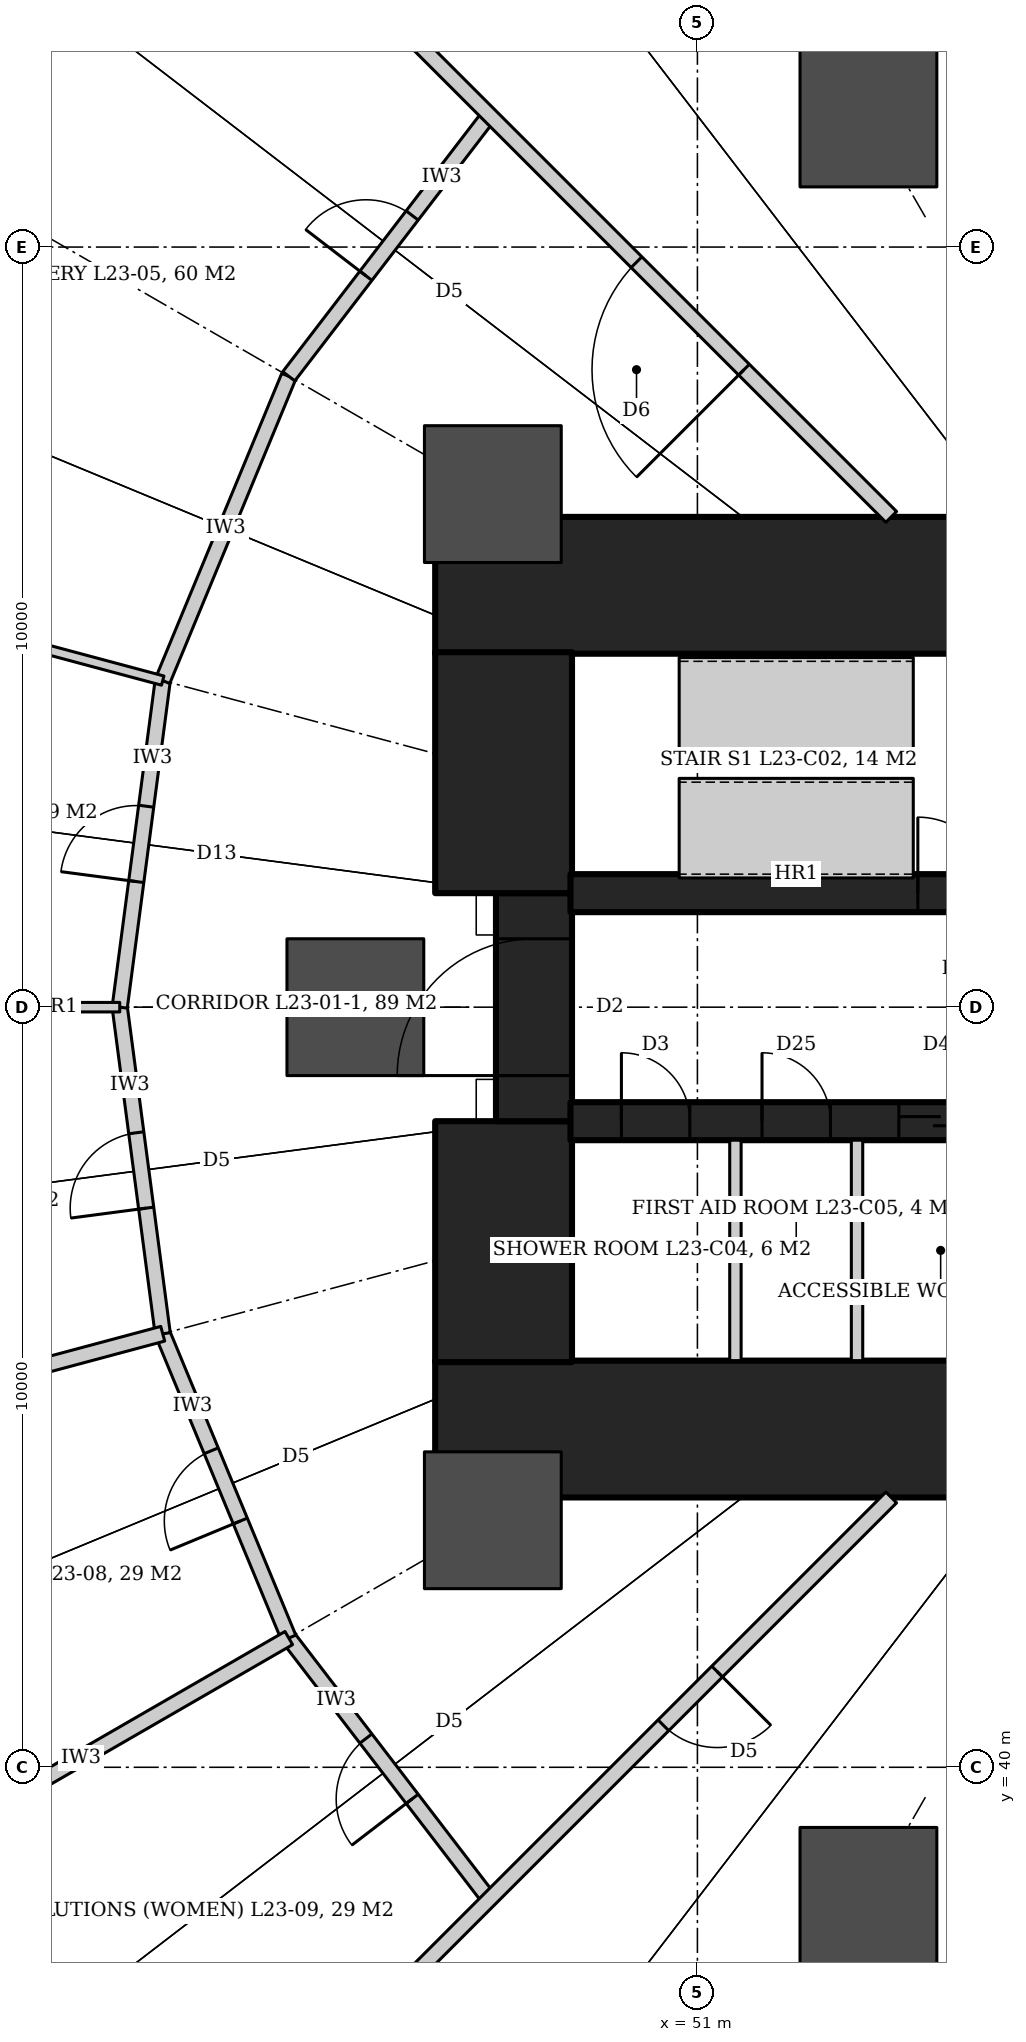
"""IFC4 building model, lengths in metres.
Left out: names, types, materials, properties, quantities, classifications, styles, units other than length and angle.
Written with IfcOpenShell. Run it as: python <this file> out.ifc"""

import sys

from ifc_helpers import new_model, si_unit, direction, frame, frame_2d, origin, origin_2d, place, context, subcontext, project, spatial, rectangle, hollow_circle, extrude, element, fill, save


model = new_model("IFC4")
c1 = context("Model", 3, precision=1e-05, world=origin(), true_north=direction((0.0, 1.0)))
c2 = subcontext(c1, "Body", "Model", "MODEL_VIEW")
j1 = project(units=[si_unit("LENGTHUNIT", "METRE"), si_unit("PLANEANGLEUNIT", "RADIAN")], contexts=[c1])
p1 = place(None, origin())
s1 = spatial("IfcSite", under=j1, at=p1, CompositionType="ELEMENT")
p2 = place(p1, origin())
s2 = spatial("IfcBuilding", under=s1, at=p2, CompositionType="ELEMENT")
p3 = place(p2, frame((0.0, 0.0, 105.8)))
s3 = spatial("IfcBuildingStorey", under=s2, at=p3, CompositionType="ELEMENT", Elevation=105.8)
for number, where, z_axis, x_axis in (
    (1, (47.55, 55.55, 0.0), (0.0, 0.0, 1.0), (1.0, 0.0, 0.0)),
    (2, (47.55, 44.45, 0.0), (0.0, 0.0, 1.0), (1.0, 0.0, 0.0)),
):
    element("IfcWall", number, at=place(p3, frame(where, z_axis=z_axis, x_axis=x_axis)), inside=s3, PredefinedType="SHEAR", context=c2, shape_type="SweptSolid", body=[
        extrude(rectangle(XDim=7.85, YDim=1.8, at=frame_2d((3.925, 0.0))), origin(), (0.0, 0.0, 1.0), 4.2),
    ])
p4 = place(p3, frame((48.45, 45.33, 0.0), z_axis=(0.0, 0.0, 1.0), x_axis=(0.0, 1.0, 0.0)))
e3 = element("IfcWall", 3, at=p4, inside=s3, PredefinedType="SHEAR", context=c2, shape_type="SweptSolid", body=[
    extrude(rectangle(XDim=3.17, YDim=1.8, at=frame_2d((1.585, 0.0))), origin(), (0.0, 0.0, 1.0), 4.2),
])
p5 = place(p3, frame((48.85, 48.5, 0.0), z_axis=(0.0, 0.0, 1.0), x_axis=(0.0, 1.0, 0.0)))
e4 = element("IfcWall", 4, at=p5, inside=s3, PredefinedType="SHEAR", context=c2, shape_type="SweptSolid", body=[
    extrude(rectangle(XDim=3.0, YDim=1.0, at=frame_2d((1.5, 0.0))), origin(), (0.0, 0.0, 1.0), 4.2),
])
p6 = place(p5, frame((0.6, 0.0, 0.0)))
e5 = element("IfcOpeningElement", 5, at=p6, cuts=e4, PredefinedType="OPENING", context=c2, shape_type="SweptSolid", body=[
    extrude(rectangle(XDim=1.8, YDim=2.1, at=frame_2d((0.9, 1.05))), frame((0.0, 0.51, 0.0), z_axis=(0.0, -1.0, 0.0), x_axis=(1.0, 0.0, 0.0)), (0.0, 0.0, 1.0), 1.02),
])
p7 = place(p3, frame((48.45, 51.5, 0.0), z_axis=(0.0, 0.0, 1.0), x_axis=(0.0, 1.0, 0.0)))
e6 = element("IfcWall", 6, at=p7, inside=s3, PredefinedType="SHEAR", context=c2, shape_type="SweptSolid", body=[
    extrude(rectangle(XDim=3.17, YDim=1.8, at=frame_2d((1.585, 0.0))), origin(), (0.0, 0.0, 1.0), 4.2),
])
p8 = place(p3, frame((49.33, 51.5, 0.0), z_axis=(0.0, 0.0, 1.0), x_axis=(1.0, 0.0, 0.0)))
e7 = element("IfcWall", 7, at=p8, inside=s3, PredefinedType="SHEAR", context=c2, shape_type="SweptSolid", body=[
    extrude(rectangle(XDim=6.07, YDim=0.5, at=frame_2d((3.035, 0.0))), origin(), (0.0, 0.0, 1.0), 4.2),
])
p9 = place(p8, frame((4.57, 0.0, 0.0)))
e8 = element("IfcOpeningElement", 8, at=p9, cuts=e7, PredefinedType="OPENING", context=c2, shape_type="SweptSolid", body=[
    extrude(rectangle(XDim=1.0, YDim=2.1, at=frame_2d((0.5, 1.05))), frame((0.0, 0.26, 0.0), z_axis=(0.0, -1.0, 0.0), x_axis=(1.0, 0.0, 0.0)), (0.0, 0.0, 1.0), 0.52),
])
p10 = place(p3, frame((49.33, 48.5, 0.0), z_axis=(0.0, 0.0, 1.0), x_axis=(1.0, 0.0, 0.0)))
e9 = element("IfcWall", 9, at=p10, inside=s3, PredefinedType="SHEAR", context=c2, shape_type="SweptSolid", body=[
    extrude(rectangle(XDim=6.07, YDim=0.5, at=frame_2d((3.035, 0.0))), origin(), (0.0, 0.0, 1.0), 4.2),
])
p11 = place(p10, frame((0.67, 0.0, 0.0)))
e10 = element("IfcOpeningElement", 10, at=p11, cuts=e9, PredefinedType="OPENING", context=c2, shape_type="SweptSolid", body=[
    extrude(rectangle(XDim=0.9, YDim=2.1, at=frame_2d((0.45, 1.05))), frame((0.0, 0.26, 0.0), z_axis=(0.0, -1.0, 0.0), x_axis=(1.0, 0.0, 0.0)), (0.0, 0.0, 1.0), 0.52),
])
p12 = place(p10, frame((2.52, 0.0, 0.0)))
e11 = element("IfcOpeningElement", 11, at=p12, cuts=e9, PredefinedType="OPENING", context=c2, shape_type="SweptSolid", body=[
    extrude(rectangle(XDim=0.9, YDim=2.1, at=frame_2d((0.45, 1.05))), frame((0.0, 0.26, 0.0), z_axis=(0.0, -1.0, 0.0), x_axis=(1.0, 0.0, 0.0)), (0.0, 0.0, 1.0), 0.52),
])
p13 = place(p10, frame((4.32, 0.0, 0.0)))
e12 = element("IfcOpeningElement", 12, at=p13, cuts=e9, PredefinedType="OPENING", context=c2, shape_type="SweptSolid", body=[
    extrude(rectangle(XDim=1.0, YDim=2.1, at=frame_2d((0.5, 1.05))), frame((0.0, 0.26, 0.0), z_axis=(0.0, -1.0, 0.0), x_axis=(1.0, 0.0, 0.0)), (0.0, 0.0, 1.0), 0.52),
])
for number, where, z_axis, x_axis in (
    (13, (53.25, 61.691, 0.0), (0.0, 0.0, 1.0), (1.0, 0.0, 0.0)),
    (14, (48.309, 56.75, 0.0), (0.0, 0.0, 1.0), (1.0, 0.0, 0.0)),
    (15, (46.5, 50.0, 0.0), (0.0, 0.0, 1.0), (1.0, 0.0, 0.0)),
    (16, (48.309, 43.25, 0.0), (0.0, 0.0, 1.0), (1.0, 0.0, 0.0)),
    (17, (53.25, 38.309, 0.0), (0.0, 0.0, 1.0), (1.0, 0.0, 0.0)),
):
    element("IfcColumn", number, at=place(p3, frame(where, z_axis=z_axis, x_axis=x_axis)), inside=s3, PredefinedType="COLUMN", context=c2, shape_type="SweptSolid", body=[
        extrude(hollow_circle(Radius=0.9, WallThickness=0.09, at=origin_2d()), origin(), (0.0, 0.0, 1.0), 4.2),
    ])
p14 = place(p3, frame((48.262, 38.262, 0.0), z_axis=(0.0, 0.0, 1.0), x_axis=(-0.60874374674, 0.79336690806, 0.0)))
e18 = element("IfcWall", 18, at=p14, inside=s3, PredefinedType="PARTITIONING", context=c2, shape_type="SweptSolid", body=[
    extrude(rectangle(XDim=4.333, YDim=0.2, at=frame_2d((2.167, 0.0))), origin(), (0.0, 0.0, 1.0), 3.04),
])
p15 = place(p14, frame((1.667, 0.0, 0.0)))
e19 = element("IfcOpeningElement", 19, at=p15, cuts=e18, PredefinedType="OPENING", context=c2, shape_type="SweptSolid", body=[
    extrude(rectangle(XDim=1.0, YDim=2.1, at=frame_2d((0.5, 1.05))), frame((0.0, 0.11, 0.0), z_axis=(0.0, -1.0, 0.0), x_axis=(1.0, 0.0, 0.0)), (0.0, 0.0, 1.0), 0.22),
])
p16 = place(p3, frame((45.624, 41.7, 0.0), z_axis=(0.0, 0.0, 1.0), x_axis=(-0.382698425325, 0.923873322082, 0.0)))
e20 = element("IfcWall", 20, at=p16, inside=s3, PredefinedType="PARTITIONING", context=c2, shape_type="SweptSolid", body=[
    extrude(rectangle(XDim=4.333, YDim=0.2, at=frame_2d((2.167, 0.0))), origin(), (0.0, 0.0, 1.0), 3.04),
])
p17 = place(p16, frame((1.667, 0.0, 0.0)))
e21 = element("IfcOpeningElement", 21, at=p17, cuts=e20, PredefinedType="OPENING", context=c2, shape_type="SweptSolid", body=[
    extrude(rectangle(XDim=1.0, YDim=2.1, at=frame_2d((0.5, 1.05))), frame((0.0, 0.11, 0.0), z_axis=(0.0, -1.0, 0.0), x_axis=(1.0, 0.0, 0.0)), (0.0, 0.0, 1.0), 0.22),
])
p18 = place(p3, frame((43.966, 45.704, 0.0), z_axis=(0.0, 0.0, 1.0), x_axis=(-0.130536124221, 0.99144355375, 0.0)))
e22 = element("IfcWall", 22, at=p18, inside=s3, PredefinedType="PARTITIONING", context=c2, shape_type="SweptSolid", body=[
    extrude(rectangle(XDim=4.333, YDim=0.2, at=frame_2d((2.167, 0.0))), origin(), (0.0, 0.0, 1.0), 3.04),
])
p19 = place(p18, frame((1.667, 0.0, 0.0)))
e23 = element("IfcOpeningElement", 23, at=p19, cuts=e22, PredefinedType="OPENING", context=c2, shape_type="SweptSolid", body=[
    extrude(rectangle(XDim=1.0, YDim=2.1, at=frame_2d((0.5, 1.05))), frame((0.0, 0.11, 0.0), z_axis=(0.0, -1.0, 0.0), x_axis=(1.0, 0.0, 0.0)), (0.0, 0.0, 1.0), 0.22),
])
p20 = place(p3, frame((43.4, 50.0, 0.0), z_axis=(0.0, 0.0, 1.0), x_axis=(0.130536124221, 0.99144355375, 0.0)))
e24 = element("IfcWall", 24, at=p20, inside=s3, PredefinedType="PARTITIONING", context=c2, shape_type="SweptSolid", body=[
    extrude(rectangle(XDim=4.333, YDim=0.2, at=frame_2d((2.167, 0.0))), origin(), (0.0, 0.0, 1.0), 3.04),
])
p21 = place(p20, frame((1.667, 0.0, 0.0)))
e25 = element("IfcOpeningElement", 25, at=p21, cuts=e24, PredefinedType="OPENING", context=c2, shape_type="SweptSolid", body=[
    extrude(rectangle(XDim=1.0, YDim=2.4, at=frame_2d((0.5, 1.2))), frame((0.0, 0.11, 0.0), z_axis=(0.0, -1.0, 0.0), x_axis=(1.0, 0.0, 0.0)), (0.0, 0.0, 1.0), 0.22),
])
p22 = place(p3, frame((43.966, 54.296, 0.0), z_axis=(0.0, 0.0, 1.0), x_axis=(0.382698425325, 0.923873322082, 0.0)))
e26 = element("IfcWall", 26, at=p22, inside=s3, PredefinedType="PARTITIONING", context=c2, shape_type="SweptSolid", body=[
    extrude(rectangle(XDim=4.333, YDim=0.2, at=frame_2d((2.167, 0.0))), origin(), (0.0, 0.0, 1.0), 3.04),
])
p23 = place(p3, frame((45.624, 58.3, 0.0), z_axis=(0.0, 0.0, 1.0), x_axis=(0.60874374674, 0.79336690806, 0.0)))
e27 = element("IfcWall", 27, at=p23, inside=s3, PredefinedType="PARTITIONING", context=c2, shape_type="SweptSolid", body=[
    extrude(rectangle(XDim=4.333, YDim=0.2, at=frame_2d((2.167, 0.0))), origin(), (0.0, 0.0, 1.0), 3.04),
])
p24 = place(p23, frame((1.667, 0.0, 0.0)))
e28 = element("IfcOpeningElement", 28, at=p24, cuts=e27, PredefinedType="OPENING", context=c2, shape_type="SweptSolid", body=[
    extrude(rectangle(XDim=1.0, YDim=2.1, at=frame_2d((0.5, 1.05))), frame((0.0, 0.11, 0.0), z_axis=(0.0, -1.0, 0.0), x_axis=(1.0, 0.0, 0.0)), (0.0, 0.0, 1.0), 0.22),
])
p25 = place(p3, frame((53.55, 56.45, 0.0), z_axis=(0.0, 0.0, 1.0), x_axis=(-0.707106781187, 0.707106781187, 0.0)))
e29 = element("IfcWall", 29, at=p25, inside=s3, PredefinedType="PARTITIONING", context=c2, shape_type="SweptSolid", body=[
    extrude(rectangle(XDim=13.788, YDim=0.2, at=frame_2d((6.894, 0.0))), origin(), (0.0, 0.0, 1.0), 3.02),
])
p26 = place(p25, frame((2.739, 0.0, 0.0)))
e30 = element("IfcOpeningElement", 30, at=p26, cuts=e29, PredefinedType="OPENING", context=c2, shape_type="SweptSolid", body=[
    extrude(rectangle(XDim=2.0, YDim=2.1, at=frame_2d((1.0, 1.05))), frame((0.0, 0.11, 0.0), z_axis=(0.0, -1.0, 0.0), x_axis=(1.0, 0.0, 0.0)), (0.0, 0.0, 1.0), 0.22),
])
p27 = place(p3, frame((43.966, 54.296, 0.0), z_axis=(0.0, 0.0, 1.0), x_axis=(-0.965929227068, 0.258806352888, 0.0)))
e31 = element("IfcWall", 31, at=p27, inside=s3, PredefinedType="PARTITIONING", context=c2, shape_type="SweptSolid", body=[
    extrude(rectangle(XDim=6.31, YDim=0.125, at=frame_2d((3.155, 0.0))), origin(), (0.0, 0.0, 1.0), 3.04),
])
p28 = place(p3, frame((43.4, 50.0, 0.0), z_axis=(0.0, 0.0, 1.0), x_axis=(-1.0, 0.0, 0.0)))
e32 = element("IfcWall", 32, at=p28, inside=s3, PredefinedType="PARTITIONING", context=c2, shape_type="SweptSolid", body=[
    extrude(rectangle(XDim=6.21, YDim=0.125, at=frame_2d((3.105, 0.0))), origin(), (0.0, 0.0, 1.0), 3.04),
])
p29 = place(p3, frame((43.966, 45.704, 0.0), z_axis=(0.0, 0.0, 1.0), x_axis=(-0.965918392585, -0.25884678647, 0.0)))
e33 = element("IfcWall", 33, at=p29, inside=s3, PredefinedType="PARTITIONING", context=c2, shape_type="SweptSolid", body=[
    extrude(rectangle(XDim=6.21, YDim=0.2, at=frame_2d((3.105, 0.0))), origin(), (0.0, 0.0, 1.0), 3.04),
])
p30 = place(p3, frame((45.624, 41.7, 0.0), z_axis=(0.0, 0.0, 1.0), x_axis=(-0.866022573651, -0.500004901903, 0.0)))
e34 = element("IfcWall", 34, at=p30, inside=s3, PredefinedType="PARTITIONING", context=c2, shape_type="SweptSolid", body=[
    extrude(rectangle(XDim=6.31, YDim=0.2, at=frame_2d((3.155, 0.0))), origin(), (0.0, 0.0, 1.0), 3.04),
])
p31 = place(p3, frame((53.55, 43.55, 0.0), z_axis=(0.0, 0.0, 1.0), x_axis=(-0.707106781187, -0.707106781187, 0.0)))
e35 = element("IfcWall", 35, at=p31, inside=s3, PredefinedType="PARTITIONING", context=c2, shape_type="SweptSolid", body=[
    extrude(rectangle(XDim=13.788, YDim=0.2, at=frame_2d((6.894, 0.0))), origin(), (0.0, 0.0, 1.0), 3.02),
])
p32 = place(p31, frame((3.239, 0.0, 0.0)))
e36 = element("IfcOpeningElement", 36, at=p32, cuts=e35, PredefinedType="OPENING", context=c2, shape_type="SweptSolid", body=[
    extrude(rectangle(XDim=1.0, YDim=2.1, at=frame_2d((0.5, 1.05))), frame((0.0, 0.11, 0.0), z_axis=(0.0, -1.0, 0.0), x_axis=(1.0, 0.0, 0.0)), (0.0, 0.0, 1.0), 0.22),
])
p33 = place(p3, frame((58.271, 43.548, 0.0), z_axis=(0.0, 0.0, 1.0), x_axis=(-0.258807515492, -0.965928915565, 0.0)))
e37 = element("IfcWall", 37, at=p33, inside=s3, PredefinedType="PARTITIONING", context=c2, shape_type="SweptSolid", body=[
    extrude(rectangle(XDim=16.23, YDim=0.2, at=frame_2d((8.115, 0.0))), origin(), (0.0, 0.0, 1.0), 3.02),
])
for number, where, z_axis, x_axis in (
    (38, (51.5, 45.35, 0.0), (0.0, 0.0, 1.0), (0.0, 1.0, 0.0)),
    (39, (53.1, 45.35, 0.0), (0.0, 0.0, 1.0), (0.0, 1.0, 0.0)),
):
    element("IfcWall", number, at=place(p3, frame(where, z_axis=z_axis, x_axis=x_axis)), inside=s3, PredefinedType="PARTITIONING", context=c2, shape_type="SweptSolid", body=[
        extrude(rectangle(XDim=2.9, YDim=0.15, at=frame_2d((1.45, 0.0))), origin(), (0.0, 0.0, 1.0), 4.04),
    ])
p34 = place(p26, origin())
e40 = element("IfcDoor", 40, at=p34, inside=s3, OperationType="DOUBLE_DOOR_DOUBLE_SWING", PredefinedType="DOOR", context=c2, shape_type="SweptSolid", body=[
    extrude(rectangle(XDim=2.0, YDim=2.1, at=frame_2d((1.0, 1.05))), frame((0.0, 0.025, 0.0), z_axis=(0.0, -1.0, 0.0), x_axis=(1.0, 0.0, 0.0)), (0.0, 0.0, 1.0), 0.05),
])
fill(e30, e40)
p35 = place(p24, origin())
e41 = element("IfcDoor", 41, at=p35, inside=s3, OperationType="SINGLE_SWING_LEFT", PredefinedType="DOOR", context=c2, shape_type="SweptSolid", body=[
    extrude(rectangle(XDim=1.0, YDim=2.1, at=frame_2d((0.5, 1.05))), frame((0.0, 0.025, 0.0), z_axis=(0.0, -1.0, 0.0), x_axis=(1.0, 0.0, 0.0)), (0.0, 0.0, 1.0), 0.05),
])
fill(e28, e41)
p36 = place(p21, origin())
e42 = element("IfcDoor", 42, at=p36, inside=s3, OperationType="SINGLE_SWING_LEFT", PredefinedType="DOOR", context=c2, shape_type="SweptSolid", body=[
    extrude(rectangle(XDim=1.0, YDim=2.4, at=frame_2d((0.5, 1.2))), frame((0.0, 0.025, 0.0), z_axis=(0.0, -1.0, 0.0), x_axis=(1.0, 0.0, 0.0)), (0.0, 0.0, 1.0), 0.05),
])
fill(e25, e42)
p37 = place(p19, origin())
e43 = element("IfcDoor", 43, at=p37, inside=s3, OperationType="SINGLE_SWING_LEFT", PredefinedType="DOOR", context=c2, shape_type="SweptSolid", body=[
    extrude(rectangle(XDim=1.0, YDim=2.1, at=frame_2d((0.5, 1.05))), frame((0.0, 0.025, 0.0), z_axis=(0.0, -1.0, 0.0), x_axis=(1.0, 0.0, 0.0)), (0.0, 0.0, 1.0), 0.05),
])
fill(e23, e43)
p38 = place(p17, origin())
e44 = element("IfcDoor", 44, at=p38, inside=s3, OperationType="SINGLE_SWING_LEFT", PredefinedType="DOOR", context=c2, shape_type="SweptSolid", body=[
    extrude(rectangle(XDim=1.0, YDim=2.1, at=frame_2d((0.5, 1.05))), frame((0.0, 0.025, 0.0), z_axis=(0.0, -1.0, 0.0), x_axis=(1.0, 0.0, 0.0)), (0.0, 0.0, 1.0), 0.05),
])
fill(e21, e44)
p39 = place(p15, origin())
e45 = element("IfcDoor", 45, at=p39, inside=s3, OperationType="SINGLE_SWING_LEFT", PredefinedType="DOOR", context=c2, shape_type="SweptSolid", body=[
    extrude(rectangle(XDim=1.0, YDim=2.1, at=frame_2d((0.5, 1.05))), frame((0.0, 0.025, 0.0), z_axis=(0.0, -1.0, 0.0), x_axis=(1.0, 0.0, 0.0)), (0.0, 0.0, 1.0), 0.05),
])
fill(e19, e45)
p40 = place(p32, origin())
e46 = element("IfcDoor", 46, at=p40, inside=s3, OperationType="SINGLE_SWING_LEFT", PredefinedType="DOOR", context=c2, shape_type="SweptSolid", body=[
    extrude(rectangle(XDim=1.0, YDim=2.1, at=frame_2d((0.5, 1.05))), frame((0.0, 0.025, 0.0), z_axis=(0.0, -1.0, 0.0), x_axis=(1.0, 0.0, 0.0)), (0.0, 0.0, 1.0), 0.05),
])
fill(e36, e46)
p41 = place(p9, origin())
e47 = element("IfcDoor", 47, at=p41, inside=s3, OperationType="SINGLE_SWING_LEFT", PredefinedType="DOOR", context=c2, shape_type="SweptSolid", body=[
    extrude(rectangle(XDim=1.0, YDim=2.1, at=frame_2d((0.5, 1.05))), frame((0.0, 0.025, 0.0), z_axis=(0.0, -1.0, 0.0), x_axis=(1.0, 0.0, 0.0)), (0.0, 0.0, 1.0), 0.05),
])
fill(e8, e47)
p42 = place(p11, origin())
e48 = element("IfcDoor", 48, at=p42, inside=s3, OperationType="SINGLE_SWING_RIGHT", PredefinedType="DOOR", context=c2, shape_type="SweptSolid", body=[
    extrude(rectangle(XDim=0.9, YDim=2.1, at=frame_2d((0.45, 1.05))), frame((0.0, 0.025, 0.0), z_axis=(0.0, -1.0, 0.0), x_axis=(1.0, 0.0, 0.0)), (0.0, 0.0, 1.0), 0.05),
])
fill(e10, e48)
p43 = place(p12, origin())
e49 = element("IfcDoor", 49, at=p43, inside=s3, OperationType="SINGLE_SWING_RIGHT", PredefinedType="DOOR", context=c2, shape_type="SweptSolid", body=[
    extrude(rectangle(XDim=0.9, YDim=2.1, at=frame_2d((0.45, 1.05))), frame((0.0, 0.025, 0.0), z_axis=(0.0, -1.0, 0.0), x_axis=(1.0, 0.0, 0.0)), (0.0, 0.0, 1.0), 0.05),
])
fill(e11, e49)
p44 = place(p13, origin())
e50 = element("IfcDoor", 50, at=p44, inside=s3, OperationType="SLIDING_TO_LEFT", PredefinedType="DOOR", context=c2, shape_type="SweptSolid", body=[
    extrude(rectangle(XDim=1.0, YDim=2.1, at=frame_2d((0.5, 1.05))), frame((0.0, 0.025, 0.0), z_axis=(0.0, -1.0, 0.0), x_axis=(1.0, 0.0, 0.0)), (0.0, 0.0, 1.0), 0.05),
])
fill(e12, e50)
p45 = place(p6, origin())
e51 = element("IfcDoor", 51, at=p45, inside=s3, OperationType="DOUBLE_DOOR_DOUBLE_SWING", PredefinedType="DOOR", context=c2, shape_type="SweptSolid", body=[
    extrude(rectangle(XDim=1.8, YDim=2.1, at=frame_2d((0.9, 1.05))), frame((0.0, 0.025, 0.0), z_axis=(0.0, -1.0, 0.0), x_axis=(1.0, 0.0, 0.0)), (0.0, 0.0, 1.0), 0.05),
])
fill(e5, e51)
save(model, sys.argv[1])
